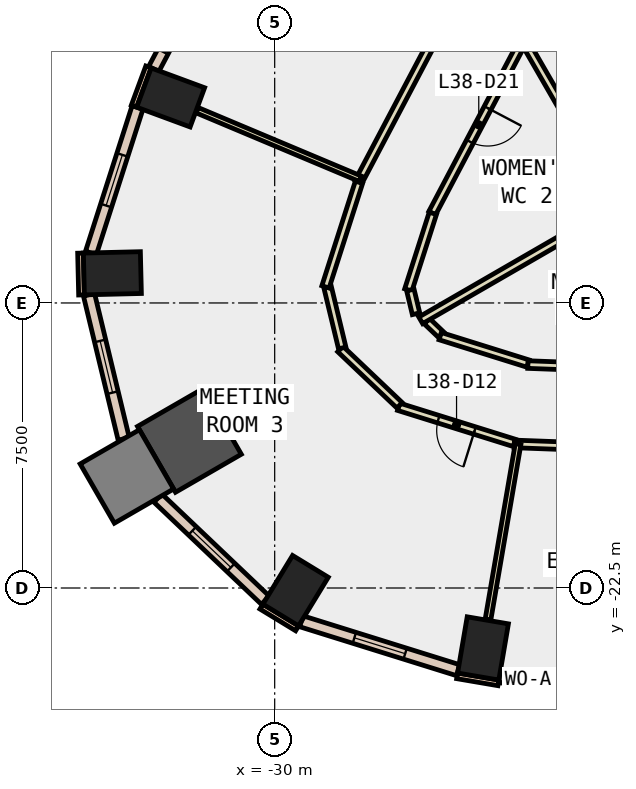
"""IFC4 building model, lengths in metres.
Left out: names, types, materials, properties, quantities, classifications, styles, units other than length and angle.
Written with IfcOpenShell. Run it as: python <this file> out.ifc"""

import sys

from ifc_helpers import new_model, si_unit, direction, frame, frame_2d, origin, origin_2d, place, context, subcontext, project, spatial, rectangle, extrude, element, fill, save


model = new_model("IFC4")
c1 = context("Model", 3, precision=1e-05, world=origin(), true_north=direction((0.0, 1.0)))
c2 = subcontext(c1, "Body", "Model", "MODEL_VIEW")
j1 = project(units=[si_unit("LENGTHUNIT", "METRE"), si_unit("PLANEANGLEUNIT", "RADIAN")], contexts=[c1])
p1 = place(None, origin())
s1 = spatial("IfcSite", under=j1, at=p1, CompositionType="ELEMENT")
p2 = place(p1, origin())
s2 = spatial("IfcBuilding", under=s1, at=p2, CompositionType="ELEMENT")
p3 = place(p2, frame((0.0, 0.0, 171.8)))
s3 = spatial("IfcBuildingStorey", under=s2, at=p3, CompositionType="ELEMENT", Elevation=171.8)
for number, where, z_axis, x_axis in (
    (1, (-24.518, -24.09, -0.4), (0.0, 0.0, 1.0), (-0.986, 0.168, 0.0)),
    (2, (-32.738, -9.593, -0.4), (0.0, 0.0, 1.0), (0.347, 0.938, 0.0)),
    (3, (-34.271, -14.219, -0.4), (0.0, 0.0, 1.0), (-0.024, 1.0, 0.0)),
):
    element("IfcColumn", number, at=place(p3, frame(where, z_axis=z_axis, x_axis=x_axis)), inside=s3, PredefinedType="COLUMN", context=c2, shape_type="SweptSolid", body=[
        extrude(rectangle(XDim=1.1, YDim=1.5, at=origin_2d()), origin(), (0.0, 0.0, 1.0), 4.2),
    ])
p4 = place(p3, frame((-32.244, -18.615, -0.4), z_axis=(0.0, 0.0, 1.0), x_axis=(0.866025403784, 0.5, 0.0)))
e4 = element("IfcColumn", 4, at=p4, inside=s3, PredefinedType="COLUMN", context=c2, shape_type="SweptSolid", body=[
    extrude(rectangle(XDim=2.0, YDim=2.0, at=origin_2d()), origin(), (0.0, 0.0, 1.0), 4.2),
])
p5 = place(p3, frame((-29.45, -22.571, -0.4), z_axis=(0.0, 0.0, 1.0), x_axis=(-0.853714435155, 0.520741455243, 0.0)))
e5 = element("IfcColumn", 5, at=p5, inside=s3, PredefinedType="COLUMN", context=c2, shape_type="SweptSolid", body=[
    extrude(rectangle(XDim=1.1, YDim=1.5, at=origin_2d()), origin(), (0.0, 0.0, 1.0), 4.2),
])
p6 = place(p3, frame((-33.889, -19.565, -0.4), z_axis=(0.0, 0.0, 1.0), x_axis=(0.866025403784, 0.5, 0.0)))
e6 = element("IfcColumn", 6, at=p6, inside=s3, PredefinedType="COLUMN", context=c2, shape_type="SweptSolid", body=[
    extrude(rectangle(XDim=1.8, YDim=1.8, at=origin_2d()), origin(), (0.0, 0.0, 1.0), 4.2),
])
p7 = place(p3, frame((-33.321, -8.791, 0.0), z_axis=(0.0, 0.0, 1.0), x_axis=(-0.346229846278, -0.938149718087, 0.0)))
e7 = element("IfcWall", 7, at=p7, inside=s3, PredefinedType="STANDARD", context=c2, shape_type="SweptSolid", body=[
    extrude(rectangle(XDim=1.1, YDim=0.15, at=frame_2d((0.55, 0.0))), origin(), (0.0, 0.0, 1.0), 3.8),
])
p8 = place(p3, frame((-25.199, -24.811, 0.0), z_axis=(0.0, 0.0, 1.0), x_axis=(0.985763338892, -0.168138751323, 0.0)))
e8 = element("IfcWall", 8, at=p8, inside=s3, PredefinedType="STANDARD", context=c2, shape_type="SweptSolid", body=[
    extrude(rectangle(XDim=1.101, YDim=0.15, at=frame_2d((0.55, 0.0))), origin(), (0.0, 0.0, 1.0), 3.8),
])
p9 = place(p3, frame((-35.109, -13.689, 0.0), z_axis=(0.0, 0.0, 1.0), x_axis=(0.023517683673, -0.999723421029, 0.0)))
e9 = element("IfcWall", 9, at=p9, inside=s3, PredefinedType="STANDARD", context=c2, shape_type="SweptSolid", body=[
    extrude(rectangle(XDim=1.1, YDim=0.15, at=frame_2d((0.55, 0.0))), origin(), (0.0, 0.0, 1.0), 3.8),
])
p10 = place(p3, frame((-30.349, -22.989, 0.0), z_axis=(0.0, 0.0, 1.0), x_axis=(0.854065628997, -0.520165263514, 0.0)))
e10 = element("IfcWall", 10, at=p10, inside=s3, PredefinedType="STANDARD", context=c2, shape_type="SweptSolid", body=[
    extrude(rectangle(XDim=1.1, YDim=0.15, at=frame_2d((0.55, 0.0))), origin(), (0.0, 0.0, 1.0), 3.8),
])
p11 = place(p3, frame((-24.09, -24.848, 0.0), z_axis=(0.0, 0.0, 1.0), x_axis=(0.999307730926, -0.037202942236, 0.0)))
e11 = element("IfcWall", 11, at=p11, inside=s3, PredefinedType="STANDARD", context=c2, shape_type="SweptSolid", body=[
    extrude(rectangle(XDim=7.317, YDim=0.3, at=frame_2d((3.659, 0.0))), origin(), (0.0, 0.0, 1.0), 3.8),
])
p12 = place(p11, frame((0.629, 0.0, 0.9)))
e12 = element("IfcOpeningElement", 12, at=p12, cuts=e11, PredefinedType="OPENING", context=c2, shape_type="SweptSolid", body=[
    extrude(rectangle(XDim=2.4, YDim=2.6, at=frame_2d((1.2, 1.3))), frame((0.0, 0.16, 0.0), z_axis=(0.0, -1.0, 0.0), x_axis=(1.0, 0.0, 0.0)), (0.0, 0.0, 1.0), 0.32),
])
p13 = place(p11, frame((4.288, 0.0, 0.9)))
e13 = element("IfcOpeningElement", 13, at=p13, cuts=e11, PredefinedType="OPENING", context=c2, shape_type="SweptSolid", body=[
    extrude(rectangle(XDim=2.4, YDim=2.6, at=frame_2d((1.2, 1.3))), frame((0.0, 0.16, 0.0), z_axis=(0.0, -1.0, 0.0), x_axis=(1.0, 0.0, 0.0)), (0.0, 0.0, 1.0), 0.32),
])
p14 = place(p3, frame((-30.358, -3.488, 0.0), z_axis=(0.0, 0.0, 1.0), x_axis=(-0.466399410196, -0.884574242316, 0.0)))
e14 = element("IfcWall", 14, at=p14, inside=s3, PredefinedType="STANDARD", context=c2, shape_type="SweptSolid", body=[
    extrude(rectangle(XDim=6.055, YDim=0.3, at=frame_2d((3.027, 0.0))), origin(), (0.0, 0.0, 1.0), 3.8),
])
p15 = place(p14, frame((0.514, 0.0, 0.9)))
e15 = element("IfcOpeningElement", 15, at=p15, cuts=e14, PredefinedType="OPENING", context=c2, shape_type="SweptSolid", body=[
    extrude(rectangle(XDim=2.0, YDim=2.6, at=frame_2d((1.0, 1.3))), frame((0.0, 0.16, 0.0), z_axis=(0.0, -1.0, 0.0), x_axis=(1.0, 0.0, 0.0)), (0.0, 0.0, 1.0), 0.32),
])
p16 = place(p14, frame((3.541, 0.0, 0.9)))
e16 = element("IfcOpeningElement", 16, at=p16, cuts=e14, PredefinedType="OPENING", context=c2, shape_type="SweptSolid", body=[
    extrude(rectangle(XDim=2.0, YDim=2.6, at=frame_2d((1.0, 1.3))), frame((0.0, 0.16, 0.0), z_axis=(0.0, -1.0, 0.0), x_axis=(1.0, 0.0, 0.0)), (0.0, 0.0, 1.0), 0.32),
])
p17 = place(p3, frame((-33.609, -9.856, 0.0), z_axis=(0.0, 0.0, 1.0), x_axis=(-0.305018133869, -0.952346543025, 0.0)))
e17 = element("IfcWall", 17, at=p17, inside=s3, PredefinedType="STANDARD", context=c2, shape_type="SweptSolid", body=[
    extrude(rectangle(XDim=4.02, YDim=0.3, at=frame_2d((2.01, 0.0))), origin(), (0.0, 0.0, 1.0), 3.8),
])
p18 = place(p17, frame((1.31, 0.0, 0.9)))
e18 = element("IfcOpeningElement", 18, at=p18, cuts=e17, PredefinedType="OPENING", context=c2, shape_type="SweptSolid", body=[
    extrude(rectangle(XDim=1.4, YDim=2.6, at=frame_2d((0.7, 1.3))), frame((0.0, 0.16, 0.0), z_axis=(0.0, -1.0, 0.0), x_axis=(1.0, 0.0, 0.0)), (0.0, 0.0, 1.0), 0.32),
])
p19 = place(p3, frame((-34.886, -14.783, 0.0), z_axis=(0.0, 0.0, 1.0), x_axis=(0.234102046927, -0.972212030179, 0.0)))
e19 = element("IfcWall", 19, at=p19, inside=s3, PredefinedType="STANDARD", context=c2, shape_type="SweptSolid", body=[
    extrude(rectangle(XDim=3.9, YDim=0.3, at=frame_2d((1.95, 0.0))), origin(), (0.0, 0.0, 1.0), 3.8),
])
p20 = place(p19, frame((1.25, 0.0, 0.9)))
e20 = element("IfcOpeningElement", 20, at=p20, cuts=e19, PredefinedType="OPENING", context=c2, shape_type="SweptSolid", body=[
    extrude(rectangle(XDim=1.4, YDim=2.6, at=frame_2d((0.7, 1.3))), frame((0.0, 0.16, 0.0), z_axis=(0.0, -1.0, 0.0), x_axis=(1.0, 0.0, 0.0)), (0.0, 0.0, 1.0), 0.32),
])
p21 = place(p3, frame((-33.074, -20.133, 0.0), z_axis=(0.0, 0.0, 1.0), x_axis=(0.724807239831, -0.688951714628, 0.0)))
e21 = element("IfcWall", 21, at=p21, inside=s3, PredefinedType="STANDARD", context=c2, shape_type="SweptSolid", body=[
    extrude(rectangle(XDim=3.902, YDim=0.3, at=frame_2d((1.951, 0.0))), origin(), (0.0, 0.0, 1.0), 3.8),
])
p22 = place(p21, frame((1.251, 0.0, 0.9)))
e22 = element("IfcOpeningElement", 22, at=p22, cuts=e21, PredefinedType="OPENING", context=c2, shape_type="SweptSolid", body=[
    extrude(rectangle(XDim=1.4, YDim=2.6, at=frame_2d((0.7, 1.3))), frame((0.0, 0.16, 0.0), z_axis=(0.0, -1.0, 0.0), x_axis=(1.0, 0.0, 0.0)), (0.0, 0.0, 1.0), 0.32),
])
p23 = place(p3, frame((-29.298, -23.376, 0.0), z_axis=(0.0, 0.0, 1.0), x_axis=(0.954628614874, -0.29779893832, 0.0)))
e23 = element("IfcWall", 23, at=p23, inside=s3, PredefinedType="STANDARD", context=c2, shape_type="SweptSolid", body=[
    extrude(rectangle(XDim=4.322, YDim=0.3, at=frame_2d((2.161, 0.0))), origin(), (0.0, 0.0, 1.0), 3.8),
])
p24 = place(p23, frame((1.461, 0.0, 0.9)))
e24 = element("IfcOpeningElement", 24, at=p24, cuts=e23, PredefinedType="OPENING", context=c2, shape_type="SweptSolid", body=[
    extrude(rectangle(XDim=1.4, YDim=2.6, at=frame_2d((0.7, 1.3))), frame((0.0, 0.16, 0.0), z_axis=(0.0, -1.0, 0.0), x_axis=(1.0, 0.0, 0.0)), (0.0, 0.0, 1.0), 0.32),
])
p25 = place(p3, frame((-23.406, -7.991, 0.0), z_axis=(0.0, 0.0, 1.0), x_axis=(-0.466307932558, -0.884622468646, 0.0)))
e25 = element("IfcWall", 25, at=p25, inside=s3, PredefinedType="PARTITIONING", context=c2, shape_type="SweptSolid", body=[
    extrude(rectangle(XDim=5.25, YDim=0.2, at=frame_2d((2.625, 0.0))), origin(), (0.0, 0.0, 1.0), 3.8),
])
p26 = place(p25, frame((2.125, 0.0, 0.0)))
e26 = element("IfcOpeningElement", 26, at=p26, cuts=e25, PredefinedType="OPENING", context=c2, shape_type="SweptSolid", body=[
    extrude(rectangle(XDim=1.0, YDim=2.1, at=frame_2d((0.5, 1.05))), frame((0.0, 0.11, 0.0), z_axis=(0.0, -1.0, 0.0), x_axis=(1.0, 0.0, 0.0)), (0.0, 0.0, 1.0), 0.22),
])
p27 = place(p3, frame((-25.838, -12.642, 0.0), z_axis=(0.0, 0.0, 1.0), x_axis=(-0.305169069368, -0.952298188122, 0.0)))
e27 = element("IfcWall", 27, at=p27, inside=s3, PredefinedType="PARTITIONING", context=c2, shape_type="SweptSolid", body=[
    extrude(rectangle(XDim=2.117, YDim=0.2, at=frame_2d((1.059, 0.0))), origin(), (0.0, 0.0, 1.0), 3.8),
])
p28 = place(p3, frame((-26.43, -14.66, 0.0), z_axis=(0.0, 0.0, 1.0), x_axis=(0.233574377125, -0.972338938, 0.0)))
e28 = element("IfcWall", 28, at=p28, inside=s3, PredefinedType="PARTITIONING", context=c2, shape_type="SweptSolid", body=[
    extrude(rectangle(XDim=0.642, YDim=0.2, at=frame_2d((0.321, 0.0))), origin(), (0.0, 0.0, 1.0), 3.8),
])
p29 = place(p3, frame((-25.998, -15.476, 0.0), z_axis=(0.0, 0.0, 1.0), x_axis=(0.724294499657, -0.689490737985, 0.0)))
e29 = element("IfcWall", 29, at=p29, inside=s3, PredefinedType="PARTITIONING", context=c2, shape_type="SweptSolid", body=[
    extrude(rectangle(XDim=0.519, YDim=0.2, at=frame_2d((0.26, 0.0))), origin(), (0.0, 0.0, 1.0), 3.8),
])
p30 = place(p3, frame((-25.645, -15.873, 0.0), z_axis=(0.0, 0.0, 1.0), x_axis=(0.95454810771, -0.298056890655, 0.0)))
e30 = element("IfcWall", 30, at=p30, inside=s3, PredefinedType="PARTITIONING", context=c2, shape_type="SweptSolid", body=[
    extrude(rectangle(XDim=2.422, YDim=0.2, at=frame_2d((1.211, 0.0))), origin(), (0.0, 0.0, 1.0), 3.8),
])
p31 = place(p3, frame((-23.337, -16.621, 0.0), z_axis=(0.0, 0.0, 1.0), x_axis=(0.999311710526, -0.037095892019, 0.0)))
e31 = element("IfcWall", 31, at=p31, inside=s3, PredefinedType="PARTITIONING", context=c2, shape_type="SweptSolid", body=[
    extrude(rectangle(XDim=4.824, YDim=0.2, at=frame_2d((2.412, 0.0))), origin(), (0.0, 0.0, 1.0), 3.8),
])
p32 = place(p31, frame((1.913, 0.0, 0.0)))
e32 = element("IfcOpeningElement", 32, at=p32, cuts=e31, PredefinedType="OPENING", context=c2, shape_type="SweptSolid", body=[
    extrude(rectangle(XDim=1.0, YDim=2.1, at=frame_2d((0.5, 1.05))), frame((0.0, 0.11, 0.0), z_axis=(0.0, -1.0, 0.0), x_axis=(1.0, 0.0, 0.0)), (0.0, 0.0, 1.0), 0.22),
])
p33 = place(p3, frame((-27.798, -11.819, 0.0), z_axis=(0.0, 0.0, 1.0), x_axis=(0.466450727507, 0.884547182918, 0.0)))
e33 = element("IfcWall", 33, at=p33, inside=s3, PredefinedType="PARTITIONING", context=c2, shape_type="SweptSolid", body=[
    extrude(rectangle(XDim=6.685, YDim=0.2, at=frame_2d((3.342, 0.0))), origin(), (0.0, 0.0, 1.0), 3.8),
])
p34 = place(p3, frame((-23.691, -18.683, 0.0), z_axis=(0.0, 0.0, 1.0), x_axis=(-0.954546657381, 0.298061535398, 0.0)))
e34 = element("IfcWall", 34, at=p34, inside=s3, PredefinedType="PARTITIONING", context=c2, shape_type="SweptSolid", body=[
    extrude(rectangle(XDim=3.191, YDim=0.2, at=frame_2d((1.596, 0.0))), origin(), (0.0, 0.0, 1.0), 3.8),
])
p35 = place(p34, frame((1.096, 0.0, 0.0)))
e35 = element("IfcOpeningElement", 35, at=p35, cuts=e34, PredefinedType="OPENING", context=c2, shape_type="SweptSolid", body=[
    extrude(rectangle(XDim=1.0, YDim=2.1, at=frame_2d((0.5, 1.05))), frame((0.0, 0.11, 0.0), z_axis=(0.0, -1.0, 0.0), x_axis=(1.0, 0.0, 0.0)), (0.0, 0.0, 1.0), 0.22),
])
p36 = place(p3, frame((-26.714, -17.693, 0.0), z_axis=(0.0, 0.0, 1.0), x_axis=(-0.724712974479, 0.689050872303, 0.0)))
e36 = element("IfcWall", 36, at=p36, inside=s3, PredefinedType="PARTITIONING", context=c2, shape_type="SweptSolid", body=[
    extrude(rectangle(XDim=2.15, YDim=0.2, at=frame_2d((1.075, 0.0))), origin(), (0.0, 0.0, 1.0), 3.8),
])
p37 = place(p3, frame((-28.223, -16.184, 0.0), z_axis=(0.0, 0.0, 1.0), x_axis=(-0.233826017197, 0.972278454807, 0.0)))
e37 = element("IfcWall", 37, at=p37, inside=s3, PredefinedType="PARTITIONING", context=c2, shape_type="SweptSolid", body=[
    extrude(rectangle(XDim=1.651, YDim=0.2, at=frame_2d((0.825, 0.0))), origin(), (0.0, 0.0, 1.0), 3.8),
])
p38 = place(p3, frame((-28.663, -14.577, 0.0), z_axis=(0.0, 0.0, 1.0), x_axis=(0.304925942137, 0.952376065329, 0.0)))
e38 = element("IfcWall", 38, at=p38, inside=s3, PredefinedType="PARTITIONING", context=c2, shape_type="SweptSolid", body=[
    extrude(rectangle(XDim=2.89, YDim=0.2, at=frame_2d((1.445, 0.0))), origin(), (0.0, 0.0, 1.0), 3.8),
])
p39 = place(p3, frame((-15.974, -18.995, 0.0), z_axis=(0.0, 0.0, 1.0), x_axis=(-0.999314011084, 0.037033866276, 0.0)))
e39 = element("IfcWall", 39, at=p39, inside=s3, PredefinedType="PARTITIONING", context=c2, shape_type="SweptSolid", body=[
    extrude(rectangle(XDim=7.726, YDim=0.2, at=frame_2d((3.863, 0.0))), origin(), (0.0, 0.0, 1.0), 3.8),
])
p40 = place(p39, frame((3.363, 0.0, 0.0)))
e40 = element("IfcOpeningElement", 40, at=p40, cuts=e39, PredefinedType="OPENING", context=c2, shape_type="SweptSolid", body=[
    extrude(rectangle(XDim=1.0, YDim=2.1, at=frame_2d((0.5, 1.05))), frame((0.0, 0.11, 0.0), z_axis=(0.0, -1.0, 0.0), x_axis=(1.0, 0.0, 0.0)), (0.0, 0.0, 1.0), 0.22),
])
p41 = place(p3, frame((-20.986, -12.351, 0.0), z_axis=(0.0, 0.0, 1.0), x_axis=(-0.499993851206, 0.866028953763, 0.0)))
e41 = element("IfcWall", 41, at=p41, inside=s3, PredefinedType="PARTITIONING", context=c2, shape_type="SweptSolid", body=[
    extrude(rectangle(XDim=4.932, YDim=0.2, at=frame_2d((2.466, 0.0))), origin(), (0.0, 0.0, 1.0), 3.8),
])
p42 = place(p3, frame((-21.021, -12.491, 0.0), z_axis=(0.0, 0.0, 1.0), x_axis=(-0.865966890845, -0.500101333692, 0.0)))
e42 = element("IfcWall", 42, at=p42, inside=s3, PredefinedType="PARTITIONING", context=c2, shape_type="SweptSolid", body=[
    extrude(rectangle(XDim=5.931, YDim=0.2, at=frame_2d((2.965, 0.0))), origin(), (0.0, 0.0, 1.0), 3.8),
])
p43 = place(p3, frame((-27.751, -11.73, 0.0), z_axis=(0.0, 0.0, 1.0), x_axis=(-0.92196786851, 0.387266380462, 0.0)))
e43 = element("IfcWall", 43, at=p43, inside=s3, PredefinedType="PARTITIONING", context=c2, shape_type="SweptSolid", body=[
    extrude(rectangle(XDim=4.653, YDim=0.15, at=frame_2d((2.327, 0.0))), origin(), (0.0, 0.0, 1.0), 3.8),
])
p44 = place(p3, frame((-23.595, -18.712, 0.0), z_axis=(0.0, 0.0, 1.0), x_axis=(-0.168992733164, -0.985617296996, 0.0)))
e44 = element("IfcWall", 44, at=p44, inside=s3, PredefinedType="PARTITIONING", context=c2, shape_type="SweptSolid", body=[
    extrude(rectangle(XDim=4.687, YDim=0.15, at=frame_2d((2.343, 0.0))), origin(), (0.0, 0.0, 1.0), 3.8),
])
p45 = place(p12, origin())
e45 = element("IfcWindow", 45, at=p45, inside=s3, PartitioningType="SINGLE_PANEL", PredefinedType="WINDOW", context=c2, shape_type="SweptSolid", body=[
    extrude(rectangle(XDim=2.4, YDim=2.6, at=frame_2d((1.2, 1.3))), frame((0.0, 0.03, 0.0), z_axis=(0.0, -1.0, 0.0), x_axis=(1.0, 0.0, 0.0)), (0.0, 0.0, 1.0), 0.06),
])
fill(e12, e45)
p46 = place(p16, origin())
e46 = element("IfcWindow", 46, at=p46, inside=s3, PartitioningType="SINGLE_PANEL", PredefinedType="WINDOW", context=c2, shape_type="SweptSolid", body=[
    extrude(rectangle(XDim=2.0, YDim=2.6, at=frame_2d((1.0, 1.3))), frame((0.0, 0.03, 0.0), z_axis=(0.0, -1.0, 0.0), x_axis=(1.0, 0.0, 0.0)), (0.0, 0.0, 1.0), 0.06),
])
fill(e16, e46)
p47 = place(p18, origin())
e47 = element("IfcWindow", 47, at=p47, inside=s3, PartitioningType="SINGLE_PANEL", PredefinedType="WINDOW", context=c2, shape_type="SweptSolid", body=[
    extrude(rectangle(XDim=1.4, YDim=2.6, at=frame_2d((0.7, 1.3))), frame((0.0, 0.03, 0.0), z_axis=(0.0, -1.0, 0.0), x_axis=(1.0, 0.0, 0.0)), (0.0, 0.0, 1.0), 0.06),
])
fill(e18, e47)
p48 = place(p20, origin())
e48 = element("IfcWindow", 48, at=p48, inside=s3, PartitioningType="SINGLE_PANEL", PredefinedType="WINDOW", context=c2, shape_type="SweptSolid", body=[
    extrude(rectangle(XDim=1.4, YDim=2.6, at=frame_2d((0.7, 1.3))), frame((0.0, 0.03, 0.0), z_axis=(0.0, -1.0, 0.0), x_axis=(1.0, 0.0, 0.0)), (0.0, 0.0, 1.0), 0.06),
])
fill(e20, e48)
p49 = place(p22, origin())
e49 = element("IfcWindow", 49, at=p49, inside=s3, PartitioningType="SINGLE_PANEL", PredefinedType="WINDOW", context=c2, shape_type="SweptSolid", body=[
    extrude(rectangle(XDim=1.4, YDim=2.6, at=frame_2d((0.7, 1.3))), frame((0.0, 0.03, 0.0), z_axis=(0.0, -1.0, 0.0), x_axis=(1.0, 0.0, 0.0)), (0.0, 0.0, 1.0), 0.06),
])
fill(e22, e49)
p50 = place(p24, origin())
e50 = element("IfcWindow", 50, at=p50, inside=s3, PartitioningType="SINGLE_PANEL", PredefinedType="WINDOW", context=c2, shape_type="SweptSolid", body=[
    extrude(rectangle(XDim=1.4, YDim=2.6, at=frame_2d((0.7, 1.3))), frame((0.0, 0.03, 0.0), z_axis=(0.0, -1.0, 0.0), x_axis=(1.0, 0.0, 0.0)), (0.0, 0.0, 1.0), 0.06),
])
fill(e24, e50)
p51 = place(p35, origin())
e51 = element("IfcDoor", 51, at=p51, inside=s3, OperationType="SINGLE_SWING_LEFT", PredefinedType="DOOR", context=c2, shape_type="SweptSolid", body=[
    extrude(rectangle(XDim=1.0, YDim=2.1, at=frame_2d((0.5, 1.05))), frame((0.0, 0.025, 0.0), z_axis=(0.0, -1.0, 0.0), x_axis=(1.0, 0.0, 0.0)), (0.0, 0.0, 1.0), 0.05),
])
fill(e35, e51)
p52 = place(p26, origin())
e52 = element("IfcDoor", 52, at=p52, inside=s3, OperationType="SINGLE_SWING_LEFT", PredefinedType="DOOR", context=c2, shape_type="SweptSolid", body=[
    extrude(rectangle(XDim=1.0, YDim=2.1, at=frame_2d((0.5, 1.05))), frame((0.0, 0.025, 0.0), z_axis=(0.0, -1.0, 0.0), x_axis=(1.0, 0.0, 0.0)), (0.0, 0.0, 1.0), 0.05),
])
fill(e26, e52)
save(model, sys.argv[1])
